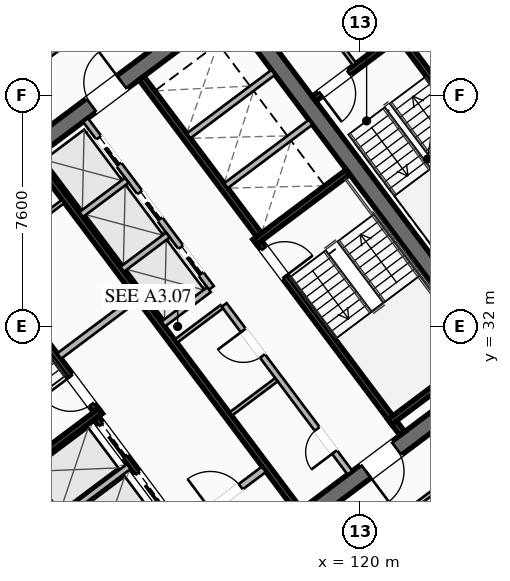
"""IFC4 building model, lengths in metres.
Left out: names, types, materials, properties, quantities, classifications, styles, units other than length and angle.
Written with IfcOpenShell. Run it as: python <this file> out.ifc"""

import sys

from ifc_helpers import new_model, si_unit, direction, frame, frame_2d, origin, place, context, subcontext, project, spatial, rectangle, extrude, element, fill, save


model = new_model("IFC4")
c1 = context("Model", 3, precision=1e-05, world=origin(), true_north=direction((0.0, 1.0)))
c2 = subcontext(c1, "Body", "Model", "MODEL_VIEW")
j1 = project(units=[si_unit("LENGTHUNIT", "METRE"), si_unit("PLANEANGLEUNIT", "RADIAN")], contexts=[c1])
p1 = place(None, origin())
s1 = spatial("IfcSite", under=j1, at=p1, CompositionType="ELEMENT")
p2 = place(p1, origin())
s2 = spatial("IfcBuilding", under=s1, at=p2, CompositionType="ELEMENT")
p3 = place(p2, frame((0.0, 0.0, 192.5)))
s3 = spatial("IfcBuildingStorey", under=s2, at=p3, CompositionType="ELEMENT", Elevation=192.5)
for number, where, z_axis, x_axis in (
    (1, (112.436, 21.077, 0.0), (0.0, 0.0, 1.0), (-0.6, 0.8, 0.0)),
    (2, (115.564, 42.923, 0.0), (0.0, 0.0, 1.0), (0.6, -0.8, 0.0)),
):
    element("IfcWall", number, at=place(p3, frame(where, z_axis=z_axis, x_axis=x_axis)), inside=s3, PredefinedType="SHEAR", context=c2, shape_type="SweptSolid", body=[
        extrude(rectangle(XDim=15.6, YDim=0.55, at=frame_2d((7.8, 0.0))), origin(), (0.0, 0.0, 1.0), 3.55),
    ])
p4 = place(p3, frame((124.539, 30.498, 0.0), z_axis=(0.0, 0.0, 1.0), x_axis=(-0.799998054672, -0.600002593761, 0.0)))
e3 = element("IfcWall", 3, at=p4, inside=s3, PredefinedType="SHEAR", context=c2, shape_type="SweptSolid", body=[
    extrude(rectangle(XDim=15.06, YDim=0.55, at=frame_2d((7.53, 0.0))), origin(), (0.0, 0.0, 1.0), 3.55),
])
p5 = place(p4, frame((9.23, 0.0, 0.0)))
e4 = element("IfcOpeningElement", 4, at=p5, cuts=e3, PredefinedType="OPENING", context=c2, shape_type="SweptSolid", body=[
    extrude(rectangle(XDim=1.25, YDim=2.25, at=frame_2d((0.625, 1.125))), frame((0.0, 0.285, 0.0), z_axis=(0.0, -1.0, 0.0), x_axis=(1.0, 0.0, 0.0)), (0.0, 0.0, 1.0), 0.57),
])
p6 = place(p4, frame((4.18, 0.0, 0.0)))
e5 = element("IfcOpeningElement", 5, at=p6, cuts=e3, PredefinedType="OPENING", context=c2, shape_type="SweptSolid", body=[
    extrude(rectangle(XDim=1.25, YDim=2.25, at=frame_2d((0.625, 1.125))), frame((0.0, 0.285, 0.0), z_axis=(0.0, -1.0, 0.0), x_axis=(1.0, 0.0, 0.0)), (0.0, 0.0, 1.0), 0.57),
])
p7 = place(p3, frame((103.461, 33.502, 0.0), z_axis=(0.0, 0.0, 1.0), x_axis=(0.799998054672, 0.600002593761, 0.0)))
e6 = element("IfcWall", 6, at=p7, inside=s3, PredefinedType="SHEAR", context=c2, shape_type="SweptSolid", body=[
    extrude(rectangle(XDim=15.06, YDim=0.55, at=frame_2d((7.53, 0.0))), origin(), (0.0, 0.0, 1.0), 3.55),
])
p8 = place(p7, frame((4.58, 0.0, 0.0)))
e7 = element("IfcOpeningElement", 7, at=p8, cuts=e6, PredefinedType="OPENING", context=c2, shape_type="SweptSolid", body=[
    extrude(rectangle(XDim=1.25, YDim=2.25, at=frame_2d((0.625, 1.125))), frame((0.0, 0.285, 0.0), z_axis=(0.0, -1.0, 0.0), x_axis=(1.0, 0.0, 0.0)), (0.0, 0.0, 1.0), 0.57),
])
p9 = place(p7, frame((9.63, 0.0, 0.0)))
e8 = element("IfcOpeningElement", 8, at=p9, cuts=e6, PredefinedType="OPENING", context=c2, shape_type="SweptSolid", body=[
    extrude(rectangle(XDim=1.25, YDim=2.25, at=frame_2d((0.625, 1.125))), frame((0.0, 0.285, 0.0), z_axis=(0.0, -1.0, 0.0), x_axis=(1.0, 0.0, 0.0)), (0.0, 0.0, 1.0), 0.57),
])
p10 = place(p3, frame((111.44, 29.08, 0.0), z_axis=(0.0, 0.0, 1.0), x_axis=(-0.59999029481, 0.8000072788, 0.0)))
e9 = element("IfcWall", 9, at=p10, inside=s3, PredefinedType="SHEAR", context=c2, shape_type="SweptSolid", body=[
    extrude(rectangle(XDim=8.05, YDim=0.2, at=frame_2d((4.025, 0.0))), origin(), (0.0, 0.0, 1.0), 3.37),
])
p11 = place(p10, frame((0.45, 0.0, 0.0)))
e10 = element("IfcOpeningElement", 10, at=p11, cuts=e9, PredefinedType="OPENING", context=c2, shape_type="SweptSolid", body=[
    extrude(rectangle(XDim=1.15, YDim=2.2, at=frame_2d((0.575, 1.1))), frame((0.0, 0.11, 0.0), z_axis=(0.0, -1.0, 0.0), x_axis=(1.0, 0.0, 0.0)), (0.0, 0.0, 1.0), 0.22),
])
p12 = place(p3, frame((108.396, 26.922, 0.0), z_axis=(0.0, 0.0, 1.0), x_axis=(0.800015298837, 0.599979601008, 0.0)))
e11 = element("IfcWall", 11, at=p12, inside=s3, PredefinedType="SHEAR", context=c2, shape_type="SweptSolid", body=[
    extrude(rectangle(XDim=3.83, YDim=0.2, at=frame_2d((1.915, 0.0))), origin(), (0.0, 0.0, 1.0), 3.37),
])
p13 = place(p3, frame((116.56, 34.92, 0.0), z_axis=(0.0, 0.0, 1.0), x_axis=(0.59999029481, -0.8000072788, 0.0)))
e12 = element("IfcWall", 12, at=p13, inside=s3, PredefinedType="SHEAR", context=c2, shape_type="SweptSolid", body=[
    extrude(rectangle(XDim=8.05, YDim=0.2, at=frame_2d((4.025, 0.0))), origin(), (0.0, 0.0, 1.0), 3.37),
])
p14 = place(p13, frame((0.45, 0.0, 0.0)))
e13 = element("IfcOpeningElement", 13, at=p14, cuts=e12, PredefinedType="OPENING", context=c2, shape_type="SweptSolid", body=[
    extrude(rectangle(XDim=1.15, YDim=2.2, at=frame_2d((0.575, 1.1))), frame((0.0, 0.11, 0.0), z_axis=(0.0, -1.0, 0.0), x_axis=(1.0, 0.0, 0.0)), (0.0, 0.0, 1.0), 0.22),
])
for number, where, z_axis, x_axis in (
    (14, (116.54, 34.78, 0.0), (0.0, 0.0, 1.0), (0.8, 0.6, 0.0)),
    (15, (120.98, 28.86, 0.0), (0.0, 0.0, 1.0), (0.8, 0.6, 0.0)),
):
    element("IfcWall", number, at=place(p3, frame(where, z_axis=z_axis, x_axis=x_axis)), inside=s3, PredefinedType="SHEAR", context=c2, shape_type="SweptSolid", body=[
        extrude(rectangle(XDim=3.83, YDim=0.2, at=frame_2d((1.915, 0.0))), origin(), (0.0, 0.0, 1.0), 3.37),
    ])
p15 = place(p3, frame((117.998, 25.936, 0.0), z_axis=(0.0, 0.0, 1.0), x_axis=(-0.600002693989, 0.799997979501, 0.0)))
e16 = element("IfcWall", 16, at=p15, inside=s3, PredefinedType="SHEAR", context=c2, shape_type="SweptSolid", body=[
    extrude(rectangle(XDim=14.5, YDim=0.2, at=frame_2d((7.25, 0.0))), origin(), (0.0, 0.0, 1.0), 3.37),
])
p16 = place(p3, frame((110.104, 31.028, 0.0), z_axis=(0.0, 0.0, 1.0), x_axis=(0.800018601094, 0.59997519774, 0.0)))
e17 = element("IfcWall", 17, at=p16, inside=s3, PredefinedType="SOLIDWALL", context=c2, shape_type="SweptSolid", body=[
    extrude(rectangle(XDim=3.15, YDim=0.22, at=frame_2d((1.575, 0.0))), origin(), (0.0, 0.0, 1.0), 2.723),
])
p17 = place(p3, frame((114.316, 25.412, 0.0), z_axis=(0.0, 0.0, 1.0), x_axis=(0.800018601094, 0.59997519774, 0.0)))
e18 = element("IfcWall", 18, at=p17, inside=s3, PredefinedType="SOLIDWALL", context=c2, shape_type="SweptSolid", body=[
    extrude(rectangle(XDim=3.15, YDim=0.22, at=frame_2d((1.575, 0.0))), origin(), (0.0, 0.0, 1.0), 2.723),
])
p18 = place(p17, frame((0.95, 0.0, 0.0)))
e19 = element("IfcOpeningElement", 19, at=p18, cuts=e18, PredefinedType="OPENING", context=c2, shape_type="SweptSolid", body=[
    extrude(rectangle(XDim=1.25, YDim=2.25, at=frame_2d((0.625, 1.125))), frame((0.0, 0.12, 0.0), z_axis=(0.0, -1.0, 0.0), x_axis=(1.0, 0.0, 0.0)), (0.0, 0.0, 1.0), 0.24),
])
p19 = place(p3, frame((115.19, 23.83, 0.0), z_axis=(0.0, 0.0, 1.0), x_axis=(-0.599993943644, 0.800004542231, 0.0)))
e20 = element("IfcWall", 20, at=p19, inside=s3, PredefinedType="SHEAR", context=c2, shape_type="SweptSolid", body=[
    extrude(rectangle(XDim=6.45, YDim=0.2, at=frame_2d((3.225, 0.0))), origin(), (0.0, 0.0, 1.0), 3.37),
])
p20 = place(p19, frame((4.875, 0.0, 0.0)))
e21 = element("IfcOpeningElement", 21, at=p20, cuts=e20, PredefinedType="OPENING", context=c2, shape_type="SweptSolid", body=[
    extrude(rectangle(XDim=1.3, YDim=2.25, at=frame_2d((0.65, 1.125))), frame((0.0, 0.11, 0.0), z_axis=(0.0, -1.0, 0.0), x_axis=(1.0, 0.0, 0.0)), (0.0, 0.0, 1.0), 0.22),
])
p21 = place(p19, frame((2.875, 0.0, 0.0)))
e22 = element("IfcOpeningElement", 22, at=p21, cuts=e20, PredefinedType="OPENING", context=c2, shape_type="SweptSolid", body=[
    extrude(rectangle(XDim=1.3, YDim=2.25, at=frame_2d((0.65, 1.125))), frame((0.0, 0.11, 0.0), z_axis=(0.0, -1.0, 0.0), x_axis=(1.0, 0.0, 0.0)), (0.0, 0.0, 1.0), 0.22),
])
p22 = place(p19, frame((0.675, 0.0, 0.0)))
e23 = element("IfcOpeningElement", 23, at=p22, cuts=e20, PredefinedType="OPENING", context=c2, shape_type="SweptSolid", body=[
    extrude(rectangle(XDim=1.3, YDim=2.25, at=frame_2d((0.65, 1.125))), frame((0.0, 0.11, 0.0), z_axis=(0.0, -1.0, 0.0), x_axis=(1.0, 0.0, 0.0)), (0.0, 0.0, 1.0), 0.22),
])
p23 = place(p3, frame((109.608, 25.306, 0.0), z_axis=(0.0, 0.0, 1.0), x_axis=(0.8, 0.6, 0.0)))
e24 = element("IfcWall", 24, at=p23, inside=s3, PredefinedType="SOLIDWALL", context=c2, shape_type="SweptSolid", body=[
    extrude(rectangle(XDim=3.48, YDim=0.2, at=frame_2d((1.74, 0.0))), origin(), (0.0, 0.0, 1.0), 3.37),
])
p24 = place(p3, frame((112.81, 40.17, 0.0), z_axis=(0.0, 0.0, 1.0), x_axis=(0.599993943644, -0.800004542231, 0.0)))
e25 = element("IfcWall", 25, at=p24, inside=s3, PredefinedType="SHEAR", context=c2, shape_type="SweptSolid", body=[
    extrude(rectangle(XDim=6.45, YDim=0.2, at=frame_2d((3.225, 0.0))), origin(), (0.0, 0.0, 1.0), 3.37),
])
for number, where, z_axis, x_axis in (
    (26, (115.59, 36.63, 0.0), (0.0, 0.0, 1.0), (0.8, 0.6, 0.0)),
    (27, (114.36, 38.27, 0.0), (0.0, 0.0, 1.0), (0.8, 0.6, 0.0)),
):
    element("IfcWall", number, at=place(p3, frame(where, z_axis=z_axis, x_axis=x_axis)), inside=s3, PredefinedType="SOLIDWALL", context=c2, shape_type="SweptSolid", body=[
        extrude(rectangle(XDim=3.48, YDim=0.2, at=frame_2d((1.74, 0.0))), origin(), (0.0, 0.0, 1.0), 3.37),
    ])
p25 = place(p3, frame((107.71, 34.22, 0.0), z_axis=(0.0, 0.0, 1.0), x_axis=(0.799981399002, 0.60002480053, 0.0)))
e28 = element("IfcWall", 28, at=p25, inside=s3, PredefinedType="PARTITIONING", context=c2, shape_type="SweptSolid", body=[
    extrude(rectangle(XDim=3.15, YDim=0.135, at=frame_2d((1.575, 0.0))), origin(), (0.0, 0.0, 1.0), 2.723),
])
p26 = place(p25, frame((1.05, 0.0, 0.0)))
e29 = element("IfcOpeningElement", 29, at=p26, cuts=e28, PredefinedType="OPENING", context=c2, shape_type="SweptSolid", body=[
    extrude(rectangle(XDim=1.05, YDim=2.2, at=frame_2d((0.525, 1.1))), frame((0.0, 0.077, 0.0), z_axis=(0.0, -1.0, 0.0), x_axis=(1.0, 0.0, 0.0)), (0.0, 0.0, 1.0), 0.155),
])
p27 = place(p3, frame((119.67, 27.19, 0.0), z_axis=(0.0, 0.0, 1.0), x_axis=(-0.599988677396, 0.800008491828, 0.0)))
e30 = element("IfcWall", 30, at=p27, inside=s3, PredefinedType="SOLIDWALL", context=c2, shape_type="SweptSolid", body=[
    extrude(rectangle(XDim=6.9, YDim=0.2, at=frame_2d((3.45, 0.0))), origin(), (0.0, 0.0, 1.0), 2.723),
])
p28 = place(p27, frame((0.85, 0.0, 0.0)))
e31 = element("IfcOpeningElement", 31, at=p28, cuts=e30, PredefinedType="OPENING", context=c2, shape_type="SweptSolid", body=[
    extrude(rectangle(XDim=0.95, YDim=2.05, at=frame_2d((0.475, 1.025))), frame((0.0, 0.11, 0.0), z_axis=(0.0, -1.0, 0.0), x_axis=(1.0, 0.0, 0.0)), (0.0, 0.0, 1.0), 0.22),
])
p29 = place(p27, frame((4.8, 0.0, 0.0)))
e32 = element("IfcOpeningElement", 32, at=p29, cuts=e30, PredefinedType="OPENING", context=c2, shape_type="SweptSolid", body=[
    extrude(rectangle(XDim=1.05, YDim=2.2, at=frame_2d((0.525, 1.1))), frame((0.0, 0.11, 0.0), z_axis=(0.0, -1.0, 0.0), x_axis=(1.0, 0.0, 0.0)), (0.0, 0.0, 1.0), 0.22),
])
for number, where, z_axis, x_axis in (
    (33, (113.946, 31.522, 0.0), (0.0, 0.0, 1.0), (0.8, 0.6, 0.0)),
    (34, (115.746, 29.122, 0.0), (0.0, 0.0, 1.0), (0.8, 0.6, 0.0)),
):
    element("IfcWall", number, at=place(p3, frame(where, z_axis=z_axis, x_axis=x_axis)), inside=s3, PredefinedType="PARTITIONING", context=c2, shape_type="SweptSolid", body=[
        extrude(rectangle(XDim=1.88, YDim=0.135, at=frame_2d((0.94, 0.0))), origin(), (0.0, 0.0, 1.0), 2.723),
    ])
p30 = place(p3, frame((115.11, 33.27, 0.0), z_axis=(0.0, 0.0, 1.0), x_axis=(-0.600011322243, 0.799991508192, 0.0)))
e35 = element("IfcWall", 35, at=p30, inside=s3, PredefinedType="SOLIDWALL", context=c2, shape_type="SweptSolid", body=[
    extrude(rectangle(XDim=6.9, YDim=0.2, at=frame_2d((3.45, 0.0))), origin(), (0.0, 0.0, 1.0), 3.37),
])
p31 = place(p30, frame((0.575, 0.0, 0.0)))
e36 = element("IfcOpeningElement", 36, at=p31, cuts=e35, PredefinedType="OPENING", context=c2, shape_type="SweptSolid", body=[
    extrude(rectangle(XDim=1.1, YDim=2.2, at=frame_2d((0.55, 1.1))), frame((0.0, 0.11, 0.0), z_axis=(0.0, -1.0, 0.0), x_axis=(1.0, 0.0, 0.0)), (0.0, 0.0, 1.0), 0.22),
])
p32 = place(p30, frame((2.825, 0.0, 0.0)))
e37 = element("IfcOpeningElement", 37, at=p32, cuts=e35, PredefinedType="OPENING", context=c2, shape_type="SweptSolid", body=[
    extrude(rectangle(XDim=1.1, YDim=2.2, at=frame_2d((0.55, 1.1))), frame((0.0, 0.11, 0.0), z_axis=(0.0, -1.0, 0.0), x_axis=(1.0, 0.0, 0.0)), (0.0, 0.0, 1.0), 0.22),
])
p33 = place(p30, frame((5.075, 0.0, 0.0)))
e38 = element("IfcOpeningElement", 38, at=p33, cuts=e35, PredefinedType="OPENING", context=c2, shape_type="SweptSolid", body=[
    extrude(rectangle(XDim=1.1, YDim=2.2, at=frame_2d((0.55, 1.1))), frame((0.0, 0.11, 0.0), z_axis=(0.0, -1.0, 0.0), x_axis=(1.0, 0.0, 0.0)), (0.0, 0.0, 1.0), 0.22),
])
p34 = place(p3, frame((113.526, 32.082, 0.0), z_axis=(0.0, 0.0, 1.0), x_axis=(0.800046745961, 0.599937666993, 0.0)))
e39 = element("IfcWall", 39, at=p34, inside=s3, PredefinedType="SOLIDWALL", context=c2, shape_type="SweptSolid", body=[
    extrude(rectangle(XDim=1.88, YDim=0.2, at=frame_2d((0.94, 0.0))), origin(), (0.0, 0.0, 1.0), 3.37),
])
p35 = place(p3, frame((112.176, 33.882, 0.0), z_axis=(0.0, 0.0, 1.0), x_axis=(0.8, 0.6, 0.0)))
e40 = element("IfcWall", 40, at=p35, inside=s3, PredefinedType="SOLIDWALL", context=c2, shape_type="SweptSolid", body=[
    extrude(rectangle(XDim=1.88, YDim=0.2, at=frame_2d((0.94, 0.0))), origin(), (0.0, 0.0, 1.0), 3.37),
])
p36 = place(p3, frame((110.826, 35.682, 0.0), z_axis=(0.0, 0.0, 1.0), x_axis=(0.799984418148, 0.600020775241, 0.0)))
e41 = element("IfcWall", 41, at=p36, inside=s3, PredefinedType="SOLIDWALL", context=c2, shape_type="SweptSolid", body=[
    extrude(rectangle(XDim=1.88, YDim=0.2, at=frame_2d((0.94, 0.0))), origin(), (0.0, 0.0, 1.0), 3.37),
])
p37 = place(p3, frame((125.304, 36.228, 0.0), z_axis=(0.0, 0.0, 1.0), x_axis=(-0.59998851072, 0.800008616831, 0.0)))
e42 = element("IfcWall", 42, at=p37, inside=s3, PredefinedType="SHEAR", context=c2, shape_type="SweptSolid", body=[
    extrude(rectangle(XDim=6.8, YDim=0.2, at=frame_2d((3.4, 0.0))), origin(), (0.0, 0.0, 1.0), 3.37),
])
p38 = place(p3, frame((121.204, 41.528, 0.0), z_axis=(0.0, 0.0, 1.0), x_axis=(-0.800017232136, -0.599977023131, 0.0)))
e43 = element("IfcWall", 43, at=p38, inside=s3, PredefinedType="SHEAR", context=c2, shape_type="SweptSolid", body=[
    extrude(rectangle(XDim=3.4, YDim=0.2, at=frame_2d((1.7, 0.0))), origin(), (0.0, 0.0, 1.0), 3.37),
])
p39 = place(p38, frame((1.975, 0.0, 0.0)))
e44 = element("IfcOpeningElement", 44, at=p39, cuts=e43, PredefinedType="OPENING", context=c2, shape_type="SweptSolid", body=[
    extrude(rectangle(XDim=1.15, YDim=2.2, at=frame_2d((0.575, 1.1))), frame((0.0, 0.11, 0.0), z_axis=(0.0, -1.0, 0.0), x_axis=(1.0, 0.0, 0.0)), (0.0, 0.0, 1.0), 0.22),
])
p40 = place(p3, frame((119.824, 40.618, 0.0), z_axis=(0.0, 0.0, 1.0), x_axis=(-0.599982243973, 0.800013316712, 0.0)))
e45 = element("IfcWall", 45, at=p40, inside=s3, PredefinedType="PARTITIONING", context=c2, shape_type="SweptSolid", body=[
    extrude(rectangle(XDim=4.4, YDim=0.135, at=frame_2d((2.2, 0.0))), origin(), (0.0, 0.0, 1.0), 2.723),
])
p41 = place(p3, frame((96.718, 31.126, 0.0), z_axis=(0.0, 0.0, 1.0), x_axis=(0.8, 0.6, 0.0)))
e46 = element("IfcWall", 46, at=p41, inside=s3, PredefinedType="PARTITIONING", context=c2, shape_type="SweptSolid", body=[
    extrude(rectangle(XDim=28.7, YDim=0.135, at=frame_2d((14.35, 0.0))), origin(), (0.0, 0.0, 1.0), 2.723),
])
p42 = place(p41, frame((0.3, 0.0, 0.0)))
e47 = element("IfcOpeningElement", 47, at=p42, cuts=e46, PredefinedType="OPENING", context=c2, shape_type="SweptSolid", body=[
    extrude(rectangle(XDim=0.95, YDim=2.05, at=frame_2d((0.475, 1.025))), frame((0.0, 0.077, 0.0), z_axis=(0.0, -1.0, 0.0), x_axis=(1.0, 0.0, 0.0)), (0.0, 0.0, 1.0), 0.155),
])
p43 = place(p41, frame((14.138, 0.0, 0.0)))
e48 = element("IfcOpeningElement", 48, at=p43, cuts=e46, PredefinedType="OPENING", context=c2, shape_type="SweptSolid", body=[
    extrude(rectangle(XDim=0.95, YDim=2.05, at=frame_2d((0.475, 1.025))), frame((0.0, 0.077, 0.0), z_axis=(0.0, -1.0, 0.0), x_axis=(1.0, 0.0, 0.0)), (0.0, 0.0, 1.0), 0.155),
])
p44 = place(p41, frame((27.45, 0.0, 0.0)))
e49 = element("IfcOpeningElement", 49, at=p44, cuts=e46, PredefinedType="OPENING", context=c2, shape_type="SweptSolid", body=[
    extrude(rectangle(XDim=0.95, YDim=2.05, at=frame_2d((0.475, 1.025))), frame((0.0, 0.077, 0.0), z_axis=(0.0, -1.0, 0.0), x_axis=(1.0, 0.0, 0.0)), (0.0, 0.0, 1.0), 0.155),
])
p45 = place(p3, frame((131.12, 33.09, 0.0), z_axis=(0.0, 0.0, 1.0), x_axis=(-0.800003062365, -0.599995916825, 0.0)))
e50 = element("IfcWall", 50, at=p45, inside=s3, PredefinedType="PARTITIONING", context=c2, shape_type="SweptSolid", body=[
    extrude(rectangle(XDim=28.7, YDim=0.135, at=frame_2d((14.35, 0.0))), origin(), (0.0, 0.0, 1.0), 2.723),
])
p46 = place(p45, frame((27.37, 0.0, 0.0)))
e51 = element("IfcOpeningElement", 51, at=p46, cuts=e50, PredefinedType="OPENING", context=c2, shape_type="SweptSolid", body=[
    extrude(rectangle(XDim=0.95, YDim=2.05, at=frame_2d((0.475, 1.025))), frame((0.0, 0.077, 0.0), z_axis=(0.0, -1.0, 0.0), x_axis=(1.0, 0.0, 0.0)), (0.0, 0.0, 1.0), 0.155),
])
p47 = place(p45, frame((13.638, 0.0, 0.0)))
e52 = element("IfcOpeningElement", 52, at=p47, cuts=e50, PredefinedType="OPENING", context=c2, shape_type="SweptSolid", body=[
    extrude(rectangle(XDim=0.95, YDim=2.05, at=frame_2d((0.475, 1.025))), frame((0.0, 0.077, 0.0), z_axis=(0.0, -1.0, 0.0), x_axis=(1.0, 0.0, 0.0)), (0.0, 0.0, 1.0), 0.155),
])
p48 = place(p45, frame((0.38, 0.0, 0.0)))
e53 = element("IfcOpeningElement", 53, at=p48, cuts=e50, PredefinedType="OPENING", context=c2, shape_type="SweptSolid", body=[
    extrude(rectangle(XDim=0.95, YDim=2.05, at=frame_2d((0.475, 1.025))), frame((0.0, 0.077, 0.0), z_axis=(0.0, -1.0, 0.0), x_axis=(1.0, 0.0, 0.0)), (0.0, 0.0, 1.0), 0.155),
])
p49 = place(p3, frame((112.104, 20.928, 0.0), z_axis=(0.0, 0.0, 1.0), x_axis=(-0.599994940075, 0.800003794918, 0.0)))
e54 = element("IfcWall", 54, at=p49, inside=s3, PredefinedType="PARTITIONING", context=c2, shape_type="SweptSolid", body=[
    extrude(rectangle(XDim=15.44, YDim=0.135, at=frame_2d((7.72, 0.0))), origin(), (0.0, 0.0, 1.0), 2.723),
])
p50 = place(p9, origin())
e55 = element("IfcDoor", 55, at=p50, inside=s3, OperationType="SINGLE_SWING_RIGHT", PredefinedType="DOOR", context=c2, shape_type="SweptSolid", body=[
    extrude(rectangle(XDim=1.25, YDim=2.25, at=frame_2d((0.625, 1.125))), frame((0.0, 0.025, 0.0), z_axis=(0.0, -1.0, 0.0), x_axis=(1.0, 0.0, 0.0)), (0.0, 0.0, 1.0), 0.05),
])
fill(e8, e55)
p51 = place(p6, origin())
e56 = element("IfcDoor", 56, at=p51, inside=s3, OperationType="SINGLE_SWING_RIGHT", PredefinedType="DOOR", context=c2, shape_type="SweptSolid", body=[
    extrude(rectangle(XDim=1.25, YDim=2.25, at=frame_2d((0.625, 1.125))), frame((0.0, 0.025, 0.0), z_axis=(0.0, -1.0, 0.0), x_axis=(1.0, 0.0, 0.0)), (0.0, 0.0, 1.0), 0.05),
])
fill(e5, e56)
p52 = place(p11, origin())
e57 = element("IfcDoor", 57, at=p52, inside=s3, OperationType="SINGLE_SWING_RIGHT", PredefinedType="DOOR", context=c2, shape_type="SweptSolid", body=[
    extrude(rectangle(XDim=1.15, YDim=2.2, at=frame_2d((0.575, 1.1))), frame((0.0, 0.025, 0.0), z_axis=(0.0, -1.0, 0.0), x_axis=(1.0, 0.0, 0.0)), (0.0, 0.0, 1.0), 0.05),
])
fill(e10, e57)
p53 = place(p14, origin())
e58 = element("IfcDoor", 58, at=p53, inside=s3, OperationType="SINGLE_SWING_RIGHT", PredefinedType="DOOR", context=c2, shape_type="SweptSolid", body=[
    extrude(rectangle(XDim=1.15, YDim=2.2, at=frame_2d((0.575, 1.1))), frame((0.0, 0.025, 0.0), z_axis=(0.0, -1.0, 0.0), x_axis=(1.0, 0.0, 0.0)), (0.0, 0.0, 1.0), 0.05),
])
fill(e13, e58)
p54 = place(p18, origin())
e59 = element("IfcDoor", 59, at=p54, inside=s3, OperationType="SINGLE_SWING_LEFT", PredefinedType="DOOR", context=c2, shape_type="SweptSolid", body=[
    extrude(rectangle(XDim=1.25, YDim=2.25, at=frame_2d((0.625, 1.125))), frame((0.0, 0.025, 0.0), z_axis=(0.0, -1.0, 0.0), x_axis=(1.0, 0.0, 0.0)), (0.0, 0.0, 1.0), 0.05),
])
fill(e19, e59)
p55 = place(p28, origin())
e60 = element("IfcDoor", 60, at=p55, inside=s3, OperationType="SINGLE_SWING_LEFT", PredefinedType="DOOR", context=c2, shape_type="SweptSolid", body=[
    extrude(rectangle(XDim=0.95, YDim=2.05, at=frame_2d((0.475, 1.025))), frame((0.0, 0.025, 0.0), z_axis=(0.0, -1.0, 0.0), x_axis=(1.0, 0.0, 0.0)), (0.0, 0.0, 1.0), 0.05),
])
fill(e31, e60)
p56 = place(p29, origin())
e61 = element("IfcDoor", 61, at=p56, inside=s3, OperationType="SINGLE_SWING_RIGHT", PredefinedType="DOOR", context=c2, shape_type="SweptSolid", body=[
    extrude(rectangle(XDim=1.05, YDim=2.2, at=frame_2d((0.525, 1.1))), frame((0.0, 0.025, 0.0), z_axis=(0.0, -1.0, 0.0), x_axis=(1.0, 0.0, 0.0)), (0.0, 0.0, 1.0), 0.05),
])
fill(e32, e61)
p57 = place(p39, origin())
e62 = element("IfcDoor", 62, at=p57, inside=s3, OperationType="SINGLE_SWING_RIGHT", PredefinedType="DOOR", context=c2, shape_type="SweptSolid", body=[
    extrude(rectangle(XDim=1.15, YDim=2.2, at=frame_2d((0.575, 1.1))), frame((0.0, 0.025, 0.0), z_axis=(0.0, -1.0, 0.0), x_axis=(1.0, 0.0, 0.0)), (0.0, 0.0, 1.0), 0.05),
])
fill(e44, e62)
p58 = place(p20, origin())
e63 = element("IfcDoor", 63, at=p58, inside=s3, OperationType="SLIDING_TO_LEFT", PredefinedType="DOOR", context=c2, shape_type="SweptSolid", body=[
    extrude(rectangle(XDim=1.3, YDim=2.25, at=frame_2d((0.65, 1.125))), frame((0.0, 0.025, 0.0), z_axis=(0.0, -1.0, 0.0), x_axis=(1.0, 0.0, 0.0)), (0.0, 0.0, 1.0), 0.05),
])
fill(e21, e63)
p59 = place(p21, origin())
e64 = element("IfcDoor", 64, at=p59, inside=s3, OperationType="SLIDING_TO_LEFT", PredefinedType="DOOR", context=c2, shape_type="SweptSolid", body=[
    extrude(rectangle(XDim=1.3, YDim=2.25, at=frame_2d((0.65, 1.125))), frame((0.0, 0.025, 0.0), z_axis=(0.0, -1.0, 0.0), x_axis=(1.0, 0.0, 0.0)), (0.0, 0.0, 1.0), 0.05),
])
fill(e22, e64)
p60 = place(p31, origin())
e65 = element("IfcDoor", 65, at=p60, inside=s3, OperationType="SLIDING_TO_LEFT", PredefinedType="DOOR", context=c2, shape_type="SweptSolid", body=[
    extrude(rectangle(XDim=1.1, YDim=2.2, at=frame_2d((0.55, 1.1))), frame((0.0, 0.025, 0.0), z_axis=(0.0, -1.0, 0.0), x_axis=(1.0, 0.0, 0.0)), (0.0, 0.0, 1.0), 0.05),
])
fill(e36, e65)
p61 = place(p32, origin())
e66 = element("IfcDoor", 66, at=p61, inside=s3, OperationType="SLIDING_TO_LEFT", PredefinedType="DOOR", context=c2, shape_type="SweptSolid", body=[
    extrude(rectangle(XDim=1.1, YDim=2.2, at=frame_2d((0.55, 1.1))), frame((0.0, 0.025, 0.0), z_axis=(0.0, -1.0, 0.0), x_axis=(1.0, 0.0, 0.0)), (0.0, 0.0, 1.0), 0.05),
])
fill(e37, e66)
p62 = place(p33, origin())
e67 = element("IfcDoor", 67, at=p62, inside=s3, OperationType="SLIDING_TO_LEFT", PredefinedType="DOOR", context=c2, shape_type="SweptSolid", body=[
    extrude(rectangle(XDim=1.1, YDim=2.2, at=frame_2d((0.55, 1.1))), frame((0.0, 0.025, 0.0), z_axis=(0.0, -1.0, 0.0), x_axis=(1.0, 0.0, 0.0)), (0.0, 0.0, 1.0), 0.05),
])
fill(e38, e67)
save(model, sys.argv[1])
